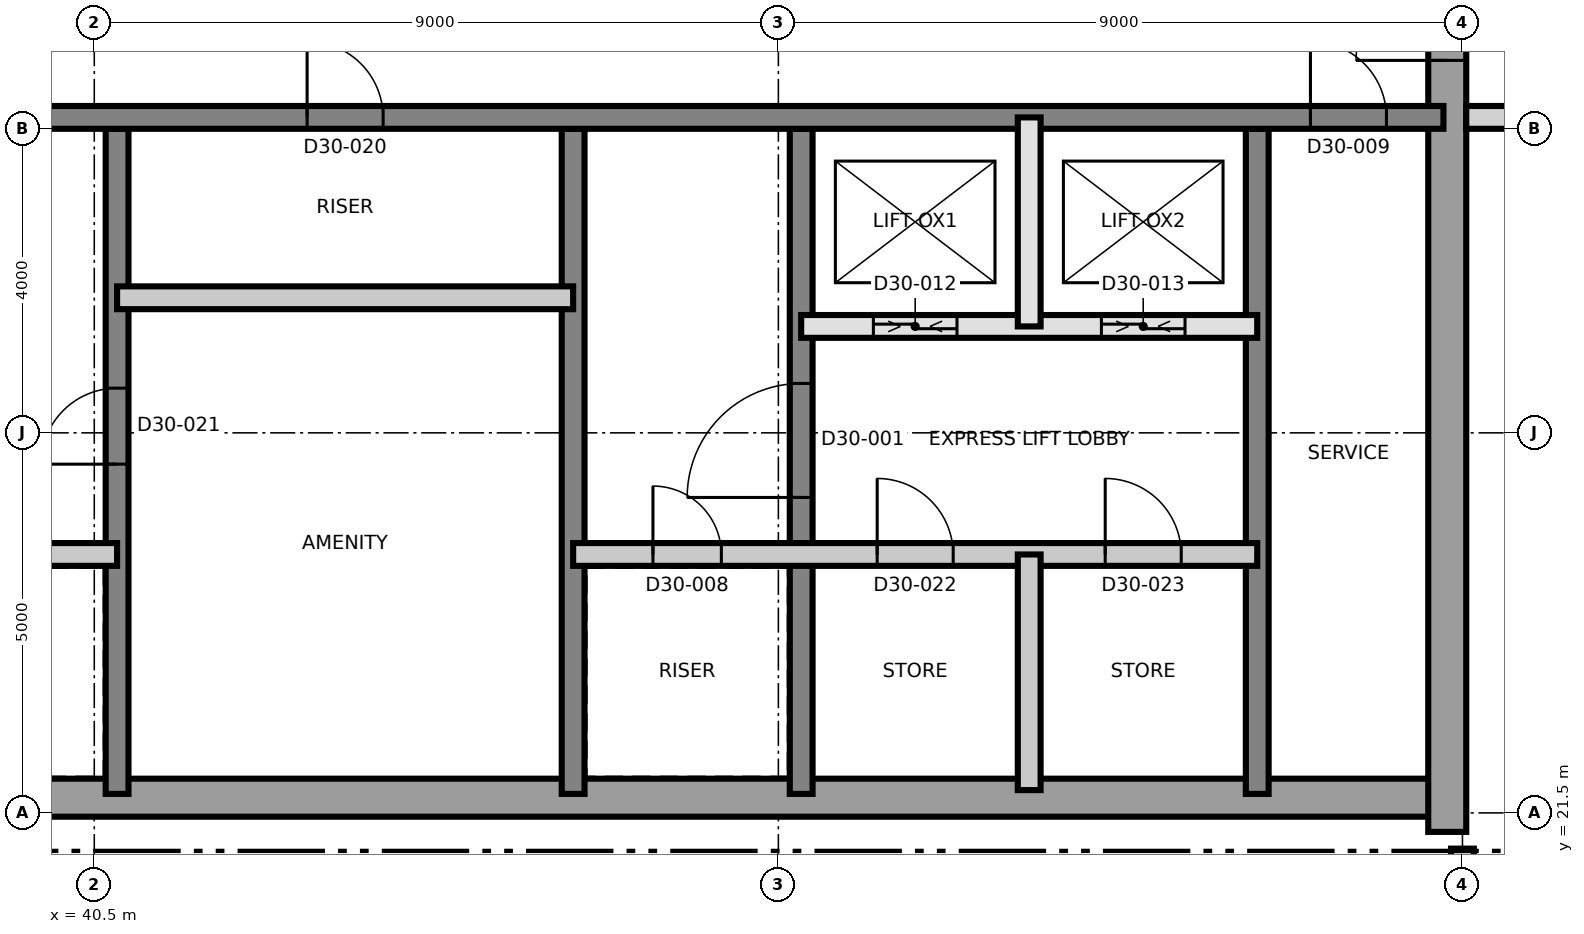
"""IFC4 building model, lengths in metres.
Left out: names, types, materials, properties, quantities, classifications, styles, units other than length and angle.
Written with IfcOpenShell. Run it as: python <this file> out.ifc"""

import sys

from ifc_helpers import new_model, si_unit, direction, frame, frame_2d, origin, place, context, subcontext, project, spatial, rectangle, extrude, element, fill, save


model = new_model("IFC4")
c1 = context("Model", 3, precision=1e-05, world=origin(), true_north=direction((0.0, 1.0)))
c2 = subcontext(c1, "Body", "Model", "MODEL_VIEW")
j1 = project(units=[si_unit("LENGTHUNIT", "METRE"), si_unit("PLANEANGLEUNIT", "RADIAN")], contexts=[c1])
p1 = place(None, origin())
s1 = spatial("IfcSite", under=j1, at=p1, CompositionType="ELEMENT")
p2 = place(p1, origin())
s2 = spatial("IfcBuilding", under=s1, at=p2, CompositionType="ELEMENT")
p3 = place(p2, frame((0.0, 0.0, 260.9)))
s3 = spatial("IfcBuildingStorey", under=s2, at=p3, CompositionType="ELEMENT", Elevation=260.9)
p4 = place(p3, frame((31.25, 21.7, 0.0), z_axis=(0.0, 0.0, 1.0), x_axis=(1.0, 0.0, 0.0)))
e1 = element("IfcWall", 1, at=p4, inside=s3, PredefinedType="SHEAR", context=c2, shape_type="SweptSolid", body=[
    extrude(rectangle(XDim=27.0, YDim=0.5, at=frame_2d((13.5, 0.0))), origin(), (0.0, 0.0, 1.0), 6.0),
])
p5 = place(p3, frame((58.3, 21.25, 0.0), z_axis=(0.0, 0.0, 1.0), x_axis=(0.0, 1.0, 0.0)))
e2 = element("IfcWall", 2, at=p5, inside=s3, PredefinedType="SHEAR", context=c2, shape_type="SweptSolid", body=[
    extrude(rectangle(XDim=18.5, YDim=0.5, at=frame_2d((9.25, 0.0))), origin(), (0.0, 0.0, 1.0), 6.0),
])
p6 = place(p5, frame((10.15, 0.0, 0.0)))
e3 = element("IfcOpeningElement", 3, at=p6, cuts=e2, PredefinedType="OPENING", context=c2, shape_type="SweptSolid", body=[
    extrude(rectangle(XDim=1.2, YDim=2.1, at=frame_2d((0.6, 1.05))), frame((0.0, 0.26, 0.0), z_axis=(0.0, -1.0, 0.0), x_axis=(1.0, 0.0, 0.0)), (0.0, 0.0, 1.0), 0.52),
])
p7 = place(p3, frame((40.8, 21.75, 0.0), z_axis=(0.0, 0.0, 1.0), x_axis=(0.0, 1.0, 0.0)))
e4 = element("IfcWall", 4, at=p7, inside=s3, PredefinedType="SHEAR", context=c2, shape_type="SweptSolid", body=[
    extrude(rectangle(XDim=8.75, YDim=0.3, at=frame_2d((4.375, 0.0))), origin(), (0.0, 0.0, 1.0), 6.0),
])
p8 = place(p7, frame((4.338, 0.0, 0.0)))
e5 = element("IfcOpeningElement", 5, at=p8, cuts=e4, PredefinedType="OPENING", context=c2, shape_type="SweptSolid", body=[
    extrude(rectangle(XDim=1.0, YDim=2.1, at=frame_2d((0.5, 1.05))), frame((0.0, 0.16, 0.0), z_axis=(0.0, -1.0, 0.0), x_axis=(1.0, 0.0, 0.0)), (0.0, 0.0, 1.0), 0.32),
])
p9 = place(p3, frame((46.8, 21.75, 0.0), z_axis=(0.0, 0.0, 1.0), x_axis=(0.0, 1.0, 0.0)))
e6 = element("IfcWall", 6, at=p9, inside=s3, PredefinedType="SHEAR", context=c2, shape_type="SweptSolid", body=[
    extrude(rectangle(XDim=8.75, YDim=0.3, at=frame_2d((4.375, 0.0))), origin(), (0.0, 0.0, 1.0), 6.0),
])
p10 = place(p3, frame((49.8, 21.75, 0.0), z_axis=(0.0, 0.0, 1.0), x_axis=(0.0, 1.0, 0.0)))
e7 = element("IfcWall", 7, at=p10, inside=s3, PredefinedType="SHEAR", context=c2, shape_type="SweptSolid", body=[
    extrude(rectangle(XDim=8.75, YDim=0.3, at=frame_2d((4.375, 0.0))), origin(), (0.0, 0.0, 1.0), 6.0),
])
p11 = place(p10, frame((3.9, 0.0, 0.0)))
e8 = element("IfcOpeningElement", 8, at=p11, cuts=e7, PredefinedType="OPENING", context=c2, shape_type="SweptSolid", body=[
    extrude(rectangle(XDim=1.5, YDim=2.1, at=frame_2d((0.75, 1.05))), frame((0.0, 0.16, 0.0), z_axis=(0.0, -1.0, 0.0), x_axis=(1.0, 0.0, 0.0)), (0.0, 0.0, 1.0), 0.32),
])
p12 = place(p3, frame((55.8, 21.75, 0.0), z_axis=(0.0, 0.0, 1.0), x_axis=(0.0, 1.0, 0.0)))
e9 = element("IfcWall", 9, at=p12, inside=s3, PredefinedType="SHEAR", context=c2, shape_type="SweptSolid", body=[
    extrude(rectangle(XDim=8.75, YDim=0.3, at=frame_2d((4.375, 0.0))), origin(), (0.0, 0.0, 1.0), 6.0),
])
p13 = place(p3, frame((31.75, 30.65, 0.0), z_axis=(0.0, 0.0, 1.0), x_axis=(1.0, 0.0, 0.0)))
e10 = element("IfcWall", 10, at=p13, inside=s3, PredefinedType="SHEAR", context=c2, shape_type="SweptSolid", body=[
    extrude(rectangle(XDim=26.5, YDim=0.3, at=frame_2d((13.25, 0.0))), origin(), (0.0, 0.0, 1.0), 6.0),
])
p14 = place(p13, frame((24.75, 0.0, 0.0)))
e11 = element("IfcOpeningElement", 11, at=p14, cuts=e10, PredefinedType="OPENING", context=c2, shape_type="SweptSolid", body=[
    extrude(rectangle(XDim=1.0, YDim=2.1, at=frame_2d((0.5, 1.05))), frame((0.0, 0.16, 0.0), z_axis=(0.0, -1.0, 0.0), x_axis=(1.0, 0.0, 0.0)), (0.0, 0.0, 1.0), 0.32),
])
p15 = place(p13, frame((11.55, 0.0, 0.0)))
e12 = element("IfcOpeningElement", 12, at=p15, cuts=e10, PredefinedType="OPENING", context=c2, shape_type="SweptSolid", body=[
    extrude(rectangle(XDim=1.0, YDim=2.1, at=frame_2d((0.5, 1.05))), frame((0.0, 0.16, 0.0), z_axis=(0.0, -1.0, 0.0), x_axis=(1.0, 0.0, 0.0)), (0.0, 0.0, 1.0), 0.32),
])
p16 = place(p3, frame((37.8, 24.9, 0.0), z_axis=(0.0, 0.0, 1.0), x_axis=(1.0, 0.0, 0.0)))
e13 = element("IfcWall", 13, at=p16, inside=s3, PredefinedType="PARTITIONING", context=c2, shape_type="SweptSolid", body=[
    extrude(rectangle(XDim=3.0, YDim=0.3, at=frame_2d((1.5, 0.0))), origin(), (0.0, 0.0, 1.0), 5.7),
])
p17 = place(p16, frame((1.05, 0.0, 0.0)))
e14 = element("IfcOpeningElement", 14, at=p17, cuts=e13, PredefinedType="OPENING", context=c2, shape_type="SweptSolid", body=[
    extrude(rectangle(XDim=0.9, YDim=2.1, at=frame_2d((0.45, 1.05))), frame((0.0, 0.16, 0.0), z_axis=(0.0, -1.0, 0.0), x_axis=(1.0, 0.0, 0.0)), (0.0, 0.0, 1.0), 0.32),
])
p18 = place(p3, frame((46.8, 24.9, 0.0), z_axis=(0.0, 0.0, 1.0), x_axis=(1.0, 0.0, 0.0)))
e15 = element("IfcWall", 15, at=p18, inside=s3, PredefinedType="PARTITIONING", context=c2, shape_type="SweptSolid", body=[
    extrude(rectangle(XDim=9.0, YDim=0.3, at=frame_2d((4.5, 0.0))), origin(), (0.0, 0.0, 1.0), 5.7),
])
p19 = place(p18, frame((1.05, 0.0, 0.0)))
e16 = element("IfcOpeningElement", 16, at=p19, cuts=e15, PredefinedType="OPENING", context=c2, shape_type="SweptSolid", body=[
    extrude(rectangle(XDim=0.9, YDim=2.1, at=frame_2d((0.45, 1.05))), frame((0.0, 0.16, 0.0), z_axis=(0.0, -1.0, 0.0), x_axis=(1.0, 0.0, 0.0)), (0.0, 0.0, 1.0), 0.32),
])
p20 = place(p18, frame((4.0, 0.0, 0.0)))
e17 = element("IfcOpeningElement", 17, at=p20, cuts=e15, PredefinedType="OPENING", context=c2, shape_type="SweptSolid", body=[
    extrude(rectangle(XDim=1.0, YDim=2.1, at=frame_2d((0.5, 1.05))), frame((0.0, 0.16, 0.0), z_axis=(0.0, -1.0, 0.0), x_axis=(1.0, 0.0, 0.0)), (0.0, 0.0, 1.0), 0.32),
])
p21 = place(p18, frame((7.0, 0.0, 0.0)))
e18 = element("IfcOpeningElement", 18, at=p21, cuts=e15, PredefinedType="OPENING", context=c2, shape_type="SweptSolid", body=[
    extrude(rectangle(XDim=1.0, YDim=2.1, at=frame_2d((0.5, 1.05))), frame((0.0, 0.16, 0.0), z_axis=(0.0, -1.0, 0.0), x_axis=(1.0, 0.0, 0.0)), (0.0, 0.0, 1.0), 0.32),
])
p22 = place(p3, frame((49.8, 27.9, 0.0), z_axis=(0.0, 0.0, 1.0), x_axis=(1.0, 0.0, 0.0)))
e19 = element("IfcWall", 19, at=p22, inside=s3, PredefinedType="SOLIDWALL", context=c2, shape_type="SweptSolid", body=[
    extrude(rectangle(XDim=6.0, YDim=0.3, at=frame_2d((3.0, 0.0))), origin(), (0.0, 0.0, 1.0), 5.7),
])
p23 = place(p22, frame((0.95, 0.0, 0.0)))
e20 = element("IfcOpeningElement", 20, at=p23, cuts=e19, PredefinedType="OPENING", context=c2, shape_type="SweptSolid", body=[
    extrude(rectangle(XDim=1.1, YDim=2.4, at=frame_2d((0.55, 1.2))), frame((0.0, 0.16, 0.0), z_axis=(0.0, -1.0, 0.0), x_axis=(1.0, 0.0, 0.0)), (0.0, 0.0, 1.0), 0.32),
])
p24 = place(p22, frame((3.95, 0.0, 0.0)))
e21 = element("IfcOpeningElement", 21, at=p24, cuts=e19, PredefinedType="OPENING", context=c2, shape_type="SweptSolid", body=[
    extrude(rectangle(XDim=1.1, YDim=2.4, at=frame_2d((0.55, 1.2))), frame((0.0, 0.16, 0.0), z_axis=(0.0, -1.0, 0.0), x_axis=(1.0, 0.0, 0.0)), (0.0, 0.0, 1.0), 0.32),
])
p25 = place(p3, frame((40.8, 28.277, 0.0), z_axis=(0.0, 0.0, 1.0), x_axis=(1.0, 0.0, 0.0)))
e22 = element("IfcWall", 22, at=p25, inside=s3, PredefinedType="PARTITIONING", context=c2, shape_type="SweptSolid", body=[
    extrude(rectangle(XDim=6.0, YDim=0.3, at=frame_2d((3.0, 0.0))), origin(), (0.0, 0.0, 1.0), 5.7),
])
p26 = place(p3, frame((52.8, 21.8, 0.0), z_axis=(0.0, 0.0, 1.0), x_axis=(0.0, 1.0, 0.0)))
e23 = element("IfcWall", 23, at=p26, inside=s3, PredefinedType="PARTITIONING", context=c2, shape_type="SweptSolid", body=[
    extrude(rectangle(XDim=3.1, YDim=0.3, at=frame_2d((1.55, 0.0))), origin(), (0.0, 0.0, 1.0), 5.7),
])
p27 = place(p3, frame((52.8, 27.9, 0.0), z_axis=(0.0, 0.0, 1.0), x_axis=(0.0, 1.0, 0.0)))
e24 = element("IfcWall", 24, at=p27, inside=s3, PredefinedType="SOLIDWALL", context=c2, shape_type="SweptSolid", body=[
    extrude(rectangle(XDim=2.75, YDim=0.3, at=frame_2d((1.375, 0.0))), origin(), (0.0, 0.0, 1.0), 5.7),
])
p28 = place(p3, frame((58.55, 30.65, 0.0), z_axis=(0.0, 0.0, 1.0), x_axis=(1.0, 0.0, 0.0)))
e25 = element("IfcWall", 25, at=p28, inside=s3, PredefinedType="PARTITIONING", context=c2, shape_type="SweptSolid", body=[
    extrude(rectangle(XDim=26.78, YDim=0.3, at=frame_2d((13.39, 0.0))), origin(), (0.0, 0.0, 1.0), 5.7),
])
p29 = place(p28, frame((9.45, 0.0, 0.0)))
e26 = element("IfcOpeningElement", 26, at=p29, cuts=e25, PredefinedType="OPENING", context=c2, shape_type="SweptSolid", body=[
    extrude(rectangle(XDim=1.4, YDim=2.1, at=frame_2d((0.7, 1.05))), frame((0.0, 0.16, 0.0), z_axis=(0.0, -1.0, 0.0), x_axis=(1.0, 0.0, 0.0)), (0.0, 0.0, 1.0), 0.32),
])
p30 = place(p28, frame((21.85, 0.0, 0.0)))
e27 = element("IfcOpeningElement", 27, at=p30, cuts=e25, PredefinedType="OPENING", context=c2, shape_type="SweptSolid", body=[
    extrude(rectangle(XDim=1.2, YDim=2.1, at=frame_2d((0.6, 1.05))), frame((0.0, 0.16, 0.0), z_axis=(0.0, -1.0, 0.0), x_axis=(1.0, 0.0, 0.0)), (0.0, 0.0, 1.0), 0.32),
])
p31 = place(p3, frame((58.5, 20.75, 0.0), z_axis=(0.0, 0.0, 1.0), x_axis=(0.0, 1.0, 0.0)))
e28 = element("IfcWall", 28, at=p31, inside=s3, PredefinedType="PARTITIONING", context=c2, shape_type="SweptSolid", body=[
    extrude(rectangle(XDim=0.28, YDim=0.3, at=frame_2d((0.14, 0.0))), origin(), (0.0, 0.0, 1.0), 5.7),
])
p32 = place(p11, origin())
e29 = element("IfcDoor", 29, at=p32, inside=s3, OperationType="SINGLE_SWING_LEFT", PredefinedType="DOOR", context=c2, shape_type="SweptSolid", body=[
    extrude(rectangle(XDim=1.5, YDim=2.1, at=frame_2d((0.75, 1.05))), frame((0.0, 0.025, 0.0), z_axis=(0.0, -1.0, 0.0), x_axis=(1.0, 0.0, 0.0)), (0.0, 0.0, 1.0), 0.05),
])
fill(e8, e29)
p33 = place(p19, origin())
e30 = element("IfcDoor", 30, at=p33, inside=s3, OperationType="SINGLE_SWING_RIGHT", PredefinedType="DOOR", context=c2, shape_type="SweptSolid", body=[
    extrude(rectangle(XDim=0.9, YDim=2.1, at=frame_2d((0.45, 1.05))), frame((0.0, 0.025, 0.0), z_axis=(0.0, -1.0, 0.0), x_axis=(1.0, 0.0, 0.0)), (0.0, 0.0, 1.0), 0.05),
])
fill(e16, e30)
p34 = place(p14, origin())
e31 = element("IfcDoor", 31, at=p34, inside=s3, OperationType="SINGLE_SWING_LEFT", PredefinedType="DOOR", context=c2, shape_type="SweptSolid", body=[
    extrude(rectangle(XDim=1.0, YDim=2.1, at=frame_2d((0.5, 1.05))), frame((0.0, 0.025, 0.0), z_axis=(0.0, -1.0, 0.0), x_axis=(1.0, 0.0, 0.0)), (0.0, 0.0, 1.0), 0.05),
])
fill(e11, e31)
p35 = place(p6, origin())
e32 = element("IfcDoor", 32, at=p35, inside=s3, OperationType="SINGLE_SWING_LEFT", PredefinedType="DOOR", context=c2, shape_type="SweptSolid", body=[
    extrude(rectangle(XDim=1.2, YDim=2.1, at=frame_2d((0.6, 1.05))), frame((0.0, 0.025, 0.0), z_axis=(0.0, -1.0, 0.0), x_axis=(1.0, 0.0, 0.0)), (0.0, 0.0, 1.0), 0.05),
])
fill(e3, e32)
p36 = place(p23, origin())
e33 = element("IfcDoor", 33, at=p36, inside=s3, OperationType="SLIDING_TO_LEFT", PredefinedType="DOOR", context=c2, shape_type="SweptSolid", body=[
    extrude(rectangle(XDim=1.1, YDim=2.4, at=frame_2d((0.55, 1.2))), frame((0.0, 0.025, 0.0), z_axis=(0.0, -1.0, 0.0), x_axis=(1.0, 0.0, 0.0)), (0.0, 0.0, 1.0), 0.05),
])
fill(e20, e33)
p37 = place(p24, origin())
e34 = element("IfcDoor", 34, at=p37, inside=s3, OperationType="SLIDING_TO_LEFT", PredefinedType="DOOR", context=c2, shape_type="SweptSolid", body=[
    extrude(rectangle(XDim=1.1, YDim=2.4, at=frame_2d((0.55, 1.2))), frame((0.0, 0.025, 0.0), z_axis=(0.0, -1.0, 0.0), x_axis=(1.0, 0.0, 0.0)), (0.0, 0.0, 1.0), 0.05),
])
fill(e21, e34)
p38 = place(p15, origin())
e35 = element("IfcDoor", 35, at=p38, inside=s3, OperationType="SINGLE_SWING_LEFT", PredefinedType="DOOR", context=c2, shape_type="SweptSolid", body=[
    extrude(rectangle(XDim=1.0, YDim=2.1, at=frame_2d((0.5, 1.05))), frame((0.0, 0.025, 0.0), z_axis=(0.0, -1.0, 0.0), x_axis=(1.0, 0.0, 0.0)), (0.0, 0.0, 1.0), 0.05),
])
fill(e12, e35)
p39 = place(p8, origin())
e36 = element("IfcDoor", 36, at=p39, inside=s3, OperationType="SINGLE_SWING_RIGHT", PredefinedType="DOOR", context=c2, shape_type="SweptSolid", body=[
    extrude(rectangle(XDim=1.0, YDim=2.1, at=frame_2d((0.5, 1.05))), frame((0.0, 0.025, 0.0), z_axis=(0.0, -1.0, 0.0), x_axis=(1.0, 0.0, 0.0)), (0.0, 0.0, 1.0), 0.05),
])
fill(e5, e36)
p40 = place(p20, origin())
e37 = element("IfcDoor", 37, at=p40, inside=s3, OperationType="SINGLE_SWING_LEFT", PredefinedType="DOOR", context=c2, shape_type="SweptSolid", body=[
    extrude(rectangle(XDim=1.0, YDim=2.1, at=frame_2d((0.5, 1.05))), frame((0.0, 0.025, 0.0), z_axis=(0.0, -1.0, 0.0), x_axis=(1.0, 0.0, 0.0)), (0.0, 0.0, 1.0), 0.05),
])
fill(e17, e37)
p41 = place(p21, origin())
e38 = element("IfcDoor", 38, at=p41, inside=s3, OperationType="SINGLE_SWING_RIGHT", PredefinedType="DOOR", context=c2, shape_type="SweptSolid", body=[
    extrude(rectangle(XDim=1.0, YDim=2.1, at=frame_2d((0.5, 1.05))), frame((0.0, 0.025, 0.0), z_axis=(0.0, -1.0, 0.0), x_axis=(1.0, 0.0, 0.0)), (0.0, 0.0, 1.0), 0.05),
])
fill(e18, e38)
save(model, sys.argv[1])
